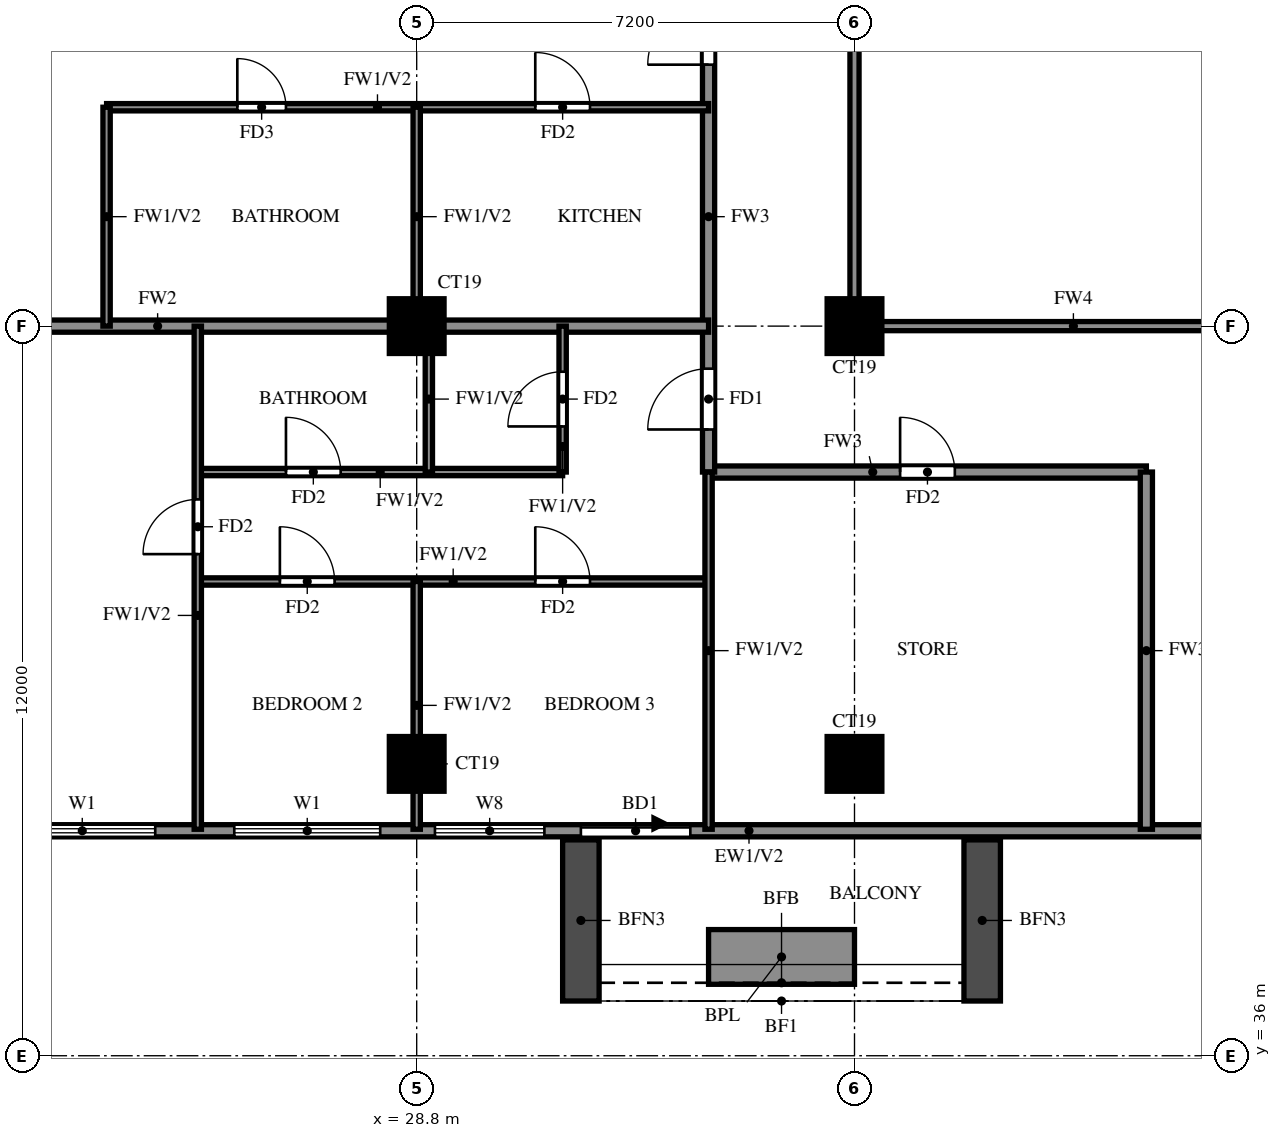
"""IFC4 building model, lengths in metres.
Left out: names, types, materials, properties, quantities, classifications, styles, units other than length and angle.
Written with IfcOpenShell. Run it as: python <this file> out.ifc"""

import sys

from ifc_helpers import new_model, si_unit, direction, frame, frame_2d, origin, origin_2d, place, context, subcontext, project, spatial, rectangle, extrude, source, transform, mapped, element, fill, save


model = new_model("IFC4")
c1 = context("Model", 3, precision=1e-05, world=origin(), true_north=direction((0.0, 1.0)))
c2 = subcontext(c1, "Body", "Model", "MODEL_VIEW")
j1 = project(units=[si_unit("LENGTHUNIT", "METRE"), si_unit("PLANEANGLEUNIT", "RADIAN")], contexts=[c1])
p1 = place(None, origin())
s1 = spatial("IfcSite", under=j1, at=p1, CompositionType="ELEMENT")
p2 = place(p1, origin())
s2 = spatial("IfcBuilding", under=s1, at=p2, CompositionType="ELEMENT")
p3 = place(p2, frame((0.0, 0.0, 174.5)))
s3 = spatial("IfcBuildingStorey", under=s2, at=p3, CompositionType="ELEMENT", Elevation=174.5)
m1 = source(origin(), c2, "Body", "SweptSolid", [
    extrude(rectangle(XDim=0.9, YDim=0.9, at=origin_2d()), origin(), (0.0, 0.0, 1.0), 3.2),
])
for number, where, z_axis, x_axis in (
    (1, (28.8, 40.8, 0.0), (0.0, 0.0, 1.0), (1.0, 0.0, 0.0)),
    (2, (36.0, 40.8, 0.0), (0.0, 0.0, 1.0), (1.0, 0.0, 0.0)),
    (3, (28.8, 48.0, 0.0), (0.0, 0.0, 1.0), (1.0, 0.0, 0.0)),
    (4, (36.0, 48.0, 0.0), (0.0, 0.0, 1.0), (1.0, 0.0, 0.0)),
):
    element("IfcColumn", number, at=place(p3, frame(where, z_axis=z_axis, x_axis=x_axis)), inside=s3, PredefinedType="COLUMN", context=c2, shape_type="MappedRepresentation", body=[
        mapped(m1, transform((0.0, 0.0, 0.0))),
    ])
p4 = place(p3, frame((18.2, 39.7, 0.0), z_axis=(0.0, 0.0, 1.0), x_axis=(1.0, 0.0, 0.0)))
e5 = element("IfcWall", 5, at=p4, inside=s3, PredefinedType="SOLIDWALL", context=c2, shape_type="SweptSolid", body=[
    extrude(rectangle(XDim=23.8, YDim=0.2, at=frame_2d((11.9, 0.0))), origin(), (0.0, 0.0, 1.0), 3.2),
])
p5 = place(p4, frame((13.3, 0.0, 0.0)))
e6 = element("IfcOpeningElement", 6, at=p5, cuts=e5, PredefinedType="OPENING", context=c2, shape_type="SweptSolid", body=[
    extrude(rectangle(XDim=1.8, YDim=2.4, at=frame_2d((0.9, 1.2))), frame((0.0, 0.11, 0.0), z_axis=(0.0, -1.0, 0.0), x_axis=(1.0, 0.0, 0.0)), (0.0, 0.0, 1.0), 0.22),
])
p6 = place(p4, frame((0.9, 0.0, 0.6)))
e7 = element("IfcOpeningElement", 7, at=p6, cuts=e5, PredefinedType="OPENING", context=c2, shape_type="SweptSolid", body=[
    extrude(rectangle(XDim=2.4, YDim=2.4, at=frame_2d((1.2, 1.2))), frame((0.0, 0.11, 0.0), z_axis=(0.0, -1.0, 0.0), x_axis=(1.0, 0.0, 0.0)), (0.0, 0.0, 1.0), 0.22),
])
p7 = place(p4, frame((3.9, 0.0, 0.6)))
e8 = element("IfcOpeningElement", 8, at=p7, cuts=e5, PredefinedType="OPENING", context=c2, shape_type="SweptSolid", body=[
    extrude(rectangle(XDim=2.4, YDim=2.4, at=frame_2d((1.2, 1.2))), frame((0.0, 0.11, 0.0), z_axis=(0.0, -1.0, 0.0), x_axis=(1.0, 0.0, 0.0)), (0.0, 0.0, 1.0), 0.22),
])
p8 = place(p4, frame((7.6, 0.0, 0.6)))
e9 = element("IfcOpeningElement", 9, at=p8, cuts=e5, PredefinedType="OPENING", context=c2, shape_type="SweptSolid", body=[
    extrude(rectangle(XDim=2.4, YDim=2.4, at=frame_2d((1.2, 1.2))), frame((0.0, 0.11, 0.0), z_axis=(0.0, -1.0, 0.0), x_axis=(1.0, 0.0, 0.0)), (0.0, 0.0, 1.0), 0.22),
])
p9 = place(p4, frame((10.9, 0.0, 0.6)))
e10 = element("IfcOpeningElement", 10, at=p9, cuts=e5, PredefinedType="OPENING", context=c2, shape_type="SweptSolid", body=[
    extrude(rectangle(XDim=1.8, YDim=2.4, at=frame_2d((0.9, 1.2))), frame((0.0, 0.11, 0.0), z_axis=(0.0, -1.0, 0.0), x_axis=(1.0, 0.0, 0.0)), (0.0, 0.0, 1.0), 0.22),
])
for number, where, z_axis, x_axis in (
    (11, (31.5, 39.55, 0.0), (0.0, 0.0, 1.0), (0.0, -1.0, 0.0)),
    (12, (38.1, 39.55, 0.0), (0.0, 0.0, 1.0), (0.0, -1.0, 0.0)),
):
    element("IfcWall", number, at=place(p3, frame(where, z_axis=z_axis, x_axis=x_axis)), inside=s3, PredefinedType="SOLIDWALL", context=c2, shape_type="SweptSolid", body=[
        extrude(rectangle(XDim=2.65, YDim=0.6, at=frame_2d((1.325, 0.0))), origin(), (0.0, 0.0, 1.0), 2.85),
    ])
p10 = place(p3, frame((33.6, 37.625, 0.0), z_axis=(0.0, 0.0, 1.0), x_axis=(1.0, 0.0, 0.0)))
e13 = element("IfcWall", 13, at=p10, inside=s3, PredefinedType="SOLIDWALL", context=c2, shape_type="SweptSolid", body=[
    extrude(rectangle(XDim=2.4, YDim=0.9, at=frame_2d((1.2, 0.0))), origin(), (0.0, 0.0, 1.0), 0.9),
])
p11 = place(p3, frame((33.6, 45.6, 0.0), z_axis=(0.0, 0.0, 1.0), x_axis=(1.0, 0.0, 0.0)))
e14 = element("IfcWall", 14, at=p11, inside=s3, PredefinedType="SOLIDWALL", context=c2, shape_type="SweptSolid", body=[
    extrude(rectangle(XDim=7.2, YDim=0.2, at=frame_2d((3.6, 0.0))), origin(), (0.0, 0.0, 1.0), 3.2),
])
p12 = place(p11, frame((3.15, 0.0, 0.0)))
e15 = element("IfcOpeningElement", 15, at=p12, cuts=e14, PredefinedType="OPENING", context=c2, shape_type="SweptSolid", body=[
    extrude(rectangle(XDim=0.9, YDim=2.1, at=frame_2d((0.45, 1.05))), frame((0.0, 0.11, 0.0), z_axis=(0.0, -1.0, 0.0), x_axis=(1.0, 0.0, 0.0)), (0.0, 0.0, 1.0), 0.22),
])
p13 = place(p3, frame((33.6, 45.6, 0.0), z_axis=(0.0, 0.0, 1.0), x_axis=(0.0, 1.0, 0.0)))
e16 = element("IfcWall", 16, at=p13, inside=s3, PredefinedType="SOLIDWALL", context=c2, shape_type="SweptSolid", body=[
    extrude(rectangle(XDim=8.4, YDim=0.2, at=frame_2d((4.2, 0.0))), origin(), (0.0, 0.0, 1.0), 3.2),
])
p14 = place(p13, frame((0.7, 0.0, 0.0)))
e17 = element("IfcOpeningElement", 17, at=p14, cuts=e16, PredefinedType="OPENING", context=c2, shape_type="SweptSolid", body=[
    extrude(rectangle(XDim=1.0, YDim=2.1, at=frame_2d((0.5, 1.05))), frame((0.0, 0.11, 0.0), z_axis=(0.0, -1.0, 0.0), x_axis=(1.0, 0.0, 0.0)), (0.0, 0.0, 1.0), 0.22),
])
p15 = place(p13, frame((6.7, 0.0, 0.0)))
e18 = element("IfcOpeningElement", 18, at=p15, cuts=e16, PredefinedType="OPENING", context=c2, shape_type="SweptSolid", body=[
    extrude(rectangle(XDim=1.0, YDim=2.1, at=frame_2d((0.5, 1.05))), frame((0.0, 0.11, 0.0), z_axis=(0.0, -1.0, 0.0), x_axis=(1.0, 0.0, 0.0)), (0.0, 0.0, 1.0), 0.22),
])
p16 = place(p3, frame((40.8, 39.725, 0.0), z_axis=(0.0, 0.0, 1.0), x_axis=(0.0, 1.0, 0.0)))
e19 = element("IfcWall", 19, at=p16, inside=s3, PredefinedType="SOLIDWALL", context=c2, shape_type="SweptSolid", body=[
    extrude(rectangle(XDim=5.875, YDim=0.2, at=frame_2d((2.938, 0.0))), origin(), (0.0, 0.0, 1.0), 3.2),
])
p17 = place(p3, frame((14.525, 48.0, 0.0), z_axis=(0.0, 0.0, 1.0), x_axis=(1.0, 0.0, 0.0)))
e20 = element("IfcWall", 20, at=p17, inside=s3, PredefinedType="SOLIDWALL", context=c2, shape_type="SweptSolid", body=[
    extrude(rectangle(XDim=19.075, YDim=0.2, at=frame_2d((9.538, 0.0))), origin(), (0.0, 0.0, 1.0), 3.2),
])
p18 = place(p3, frame((25.2, 43.8, 0.0), z_axis=(0.0, 0.0, 1.0), x_axis=(1.0, 0.0, 0.0)))
e21 = element("IfcWall", 21, at=p18, inside=s3, PredefinedType="PARTITIONING", context=c2, shape_type="SweptSolid", body=[
    extrude(rectangle(XDim=8.4, YDim=0.12, at=frame_2d((4.2, 0.0))), origin(), (0.0, 0.0, 1.0), 3.2),
])
p19 = place(p18, frame((1.35, 0.0, 0.0)))
e22 = element("IfcOpeningElement", 22, at=p19, cuts=e21, PredefinedType="OPENING", context=c2, shape_type="SweptSolid", body=[
    extrude(rectangle(XDim=0.9, YDim=2.1, at=frame_2d((0.45, 1.05))), frame((0.0, 0.07, 0.0), z_axis=(0.0, -1.0, 0.0), x_axis=(1.0, 0.0, 0.0)), (0.0, 0.0, 1.0), 0.14),
])
p20 = place(p18, frame((5.55, 0.0, 0.0)))
e23 = element("IfcOpeningElement", 23, at=p20, cuts=e21, PredefinedType="OPENING", context=c2, shape_type="SweptSolid", body=[
    extrude(rectangle(XDim=0.9, YDim=2.1, at=frame_2d((0.45, 1.05))), frame((0.0, 0.07, 0.0), z_axis=(0.0, -1.0, 0.0), x_axis=(1.0, 0.0, 0.0)), (0.0, 0.0, 1.0), 0.14),
])
p21 = place(p3, frame((25.2, 45.6, 0.0), z_axis=(0.0, 0.0, 1.0), x_axis=(1.0, 0.0, 0.0)))
e24 = element("IfcWall", 24, at=p21, inside=s3, PredefinedType="PARTITIONING", context=c2, shape_type="SweptSolid", body=[
    extrude(rectangle(XDim=6.0, YDim=0.12, at=frame_2d((3.0, 0.0))), origin(), (0.0, 0.0, 1.0), 3.2),
])
p22 = place(p21, frame((1.45, 0.0, 0.0)))
e25 = element("IfcOpeningElement", 25, at=p22, cuts=e24, PredefinedType="OPENING", context=c2, shape_type="SweptSolid", body=[
    extrude(rectangle(XDim=0.9, YDim=2.1, at=frame_2d((0.45, 1.05))), frame((0.0, 0.07, 0.0), z_axis=(0.0, -1.0, 0.0), x_axis=(1.0, 0.0, 0.0)), (0.0, 0.0, 1.0), 0.14),
])
p23 = place(p3, frame((23.7, 51.6, 0.0), z_axis=(0.0, 0.0, 1.0), x_axis=(1.0, 0.0, 0.0)))
e26 = element("IfcWall", 26, at=p23, inside=s3, PredefinedType="PARTITIONING", context=c2, shape_type="SweptSolid", body=[
    extrude(rectangle(XDim=9.9, YDim=0.12, at=frame_2d((4.95, 0.0))), origin(), (0.0, 0.0, 1.0), 3.2),
])
p24 = place(p23, frame((2.15, 0.0, 0.0)))
e27 = element("IfcOpeningElement", 27, at=p24, cuts=e26, PredefinedType="OPENING", context=c2, shape_type="SweptSolid", body=[
    extrude(rectangle(XDim=0.8, YDim=2.1, at=frame_2d((0.4, 1.05))), frame((0.0, 0.07, 0.0), z_axis=(0.0, -1.0, 0.0), x_axis=(1.0, 0.0, 0.0)), (0.0, 0.0, 1.0), 0.14),
])
p25 = place(p23, frame((7.05, 0.0, 0.0)))
e28 = element("IfcOpeningElement", 28, at=p25, cuts=e26, PredefinedType="OPENING", context=c2, shape_type="SweptSolid", body=[
    extrude(rectangle(XDim=0.9, YDim=2.1, at=frame_2d((0.45, 1.05))), frame((0.0, 0.07, 0.0), z_axis=(0.0, -1.0, 0.0), x_axis=(1.0, 0.0, 0.0)), (0.0, 0.0, 1.0), 0.14),
])
p26 = place(p3, frame((23.7, 48.0, 0.0), z_axis=(0.0, 0.0, 1.0), x_axis=(0.0, 1.0, 0.0)))
e29 = element("IfcWall", 29, at=p26, inside=s3, PredefinedType="PARTITIONING", context=c2, shape_type="SweptSolid", body=[
    extrude(rectangle(XDim=3.6, YDim=0.12, at=frame_2d((1.8, 0.0))), origin(), (0.0, 0.0, 1.0), 3.2),
])
p27 = place(p3, frame((25.2, 39.725, 0.0), z_axis=(0.0, 0.0, 1.0), x_axis=(0.0, 1.0, 0.0)))
e30 = element("IfcWall", 30, at=p27, inside=s3, PredefinedType="PARTITIONING", context=c2, shape_type="SweptSolid", body=[
    extrude(rectangle(XDim=8.275, YDim=0.12, at=frame_2d((4.137, 0.0))), origin(), (0.0, 0.0, 1.0), 3.2),
])
p28 = place(p27, frame((4.525, 0.0, 0.0)))
e31 = element("IfcOpeningElement", 31, at=p28, cuts=e30, PredefinedType="OPENING", context=c2, shape_type="SweptSolid", body=[
    extrude(rectangle(XDim=0.9, YDim=2.1, at=frame_2d((0.45, 1.05))), frame((0.0, 0.07, 0.0), z_axis=(0.0, -1.0, 0.0), x_axis=(1.0, 0.0, 0.0)), (0.0, 0.0, 1.0), 0.14),
])
p29 = place(p3, frame((28.8, 39.725, 0.0), z_axis=(0.0, 0.0, 1.0), x_axis=(0.0, 1.0, 0.0)))
e32 = element("IfcWall", 32, at=p29, inside=s3, PredefinedType="PARTITIONING", context=c2, shape_type="SweptSolid", body=[
    extrude(rectangle(XDim=4.075, YDim=0.12, at=frame_2d((2.038, 0.0))), origin(), (0.0, 0.0, 1.0), 3.2),
])
p30 = place(p3, frame((28.8, 48.0, 0.0), z_axis=(0.0, 0.0, 1.0), x_axis=(0.0, 1.0, 0.0)))
e33 = element("IfcWall", 33, at=p30, inside=s3, PredefinedType="PARTITIONING", context=c2, shape_type="SweptSolid", body=[
    extrude(rectangle(XDim=3.6, YDim=0.12, at=frame_2d((1.8, 0.0))), origin(), (0.0, 0.0, 1.0), 3.2),
])
p31 = place(p3, frame((29.0, 45.6, 0.0), z_axis=(0.0, 0.0, 1.0), x_axis=(0.0, 1.0, 0.0)))
e34 = element("IfcWall", 34, at=p31, inside=s3, PredefinedType="PARTITIONING", context=c2, shape_type="SweptSolid", body=[
    extrude(rectangle(XDim=2.4, YDim=0.12, at=frame_2d((1.2, 0.0))), origin(), (0.0, 0.0, 1.0), 3.2),
])
p32 = place(p3, frame((31.2, 45.6, 0.0), z_axis=(0.0, 0.0, 1.0), x_axis=(0.0, 1.0, 0.0)))
e35 = element("IfcWall", 35, at=p32, inside=s3, PredefinedType="PARTITIONING", context=c2, shape_type="SweptSolid", body=[
    extrude(rectangle(XDim=2.4, YDim=0.12, at=frame_2d((1.2, 0.0))), origin(), (0.0, 0.0, 1.0), 3.2),
])
p33 = place(p32, frame((0.75, 0.0, 0.0)))
e36 = element("IfcOpeningElement", 36, at=p33, cuts=e35, PredefinedType="OPENING", context=c2, shape_type="SweptSolid", body=[
    extrude(rectangle(XDim=0.9, YDim=2.1, at=frame_2d((0.45, 1.05))), frame((0.0, 0.07, 0.0), z_axis=(0.0, -1.0, 0.0), x_axis=(1.0, 0.0, 0.0)), (0.0, 0.0, 1.0), 0.14),
])
p34 = place(p3, frame((33.6, 39.725, 0.0), z_axis=(0.0, 0.0, 1.0), x_axis=(0.0, 1.0, 0.0)))
e37 = element("IfcWall", 37, at=p34, inside=s3, PredefinedType="PARTITIONING", context=c2, shape_type="SweptSolid", body=[
    extrude(rectangle(XDim=5.875, YDim=0.12, at=frame_2d((2.938, 0.0))), origin(), (0.0, 0.0, 1.0), 3.2),
])
p35 = place(p3, frame((36.0, 48.0, 0.0), z_axis=(0.0, 0.0, 1.0), x_axis=(1.0, 0.0, 0.0)))
e38 = element("IfcWall", 38, at=p35, inside=s3, PredefinedType="SOLIDWALL", context=c2, shape_type="SweptSolid", body=[
    extrude(rectangle(XDim=7.2, YDim=0.15, at=frame_2d((3.6, 0.0))), origin(), (0.0, 0.0, 1.0), 2.3),
])
p36 = place(p3, frame((36.0, 48.0, 0.0), z_axis=(0.0, 0.0, 1.0), x_axis=(0.0, 1.0, 0.0)))
e39 = element("IfcWall", 39, at=p36, inside=s3, PredefinedType="SOLIDWALL", context=c2, shape_type="SweptSolid", body=[
    extrude(rectangle(XDim=14.4, YDim=0.15, at=frame_2d((7.2, 0.0))), origin(), (0.0, 0.0, 1.0), 2.3),
])
p37 = place(p5, origin())
e40 = element("IfcDoor", 40, at=p37, inside=s3, OperationType="DOUBLE_DOOR_SLIDING", PredefinedType="DOOR", context=c2, shape_type="SweptSolid", body=[
    extrude(rectangle(XDim=1.8, YDim=2.4, at=frame_2d((0.9, 1.2))), frame((0.0, 0.025, 0.0), z_axis=(0.0, -1.0, 0.0), x_axis=(1.0, 0.0, 0.0)), (0.0, 0.0, 1.0), 0.05),
])
fill(e6, e40)
p38 = place(p7, origin())
e41 = element("IfcWindow", 41, at=p38, inside=s3, PartitioningType="DOUBLE_PANEL_VERTICAL", PredefinedType="WINDOW", context=c2, shape_type="SweptSolid", body=[
    extrude(rectangle(XDim=2.4, YDim=2.4, at=frame_2d((1.2, 1.2))), frame((0.0, 0.03, 0.0), z_axis=(0.0, -1.0, 0.0), x_axis=(1.0, 0.0, 0.0)), (0.0, 0.0, 1.0), 0.06),
])
fill(e8, e41)
p39 = place(p8, origin())
e42 = element("IfcWindow", 42, at=p39, inside=s3, PartitioningType="DOUBLE_PANEL_VERTICAL", PredefinedType="WINDOW", context=c2, shape_type="SweptSolid", body=[
    extrude(rectangle(XDim=2.4, YDim=2.4, at=frame_2d((1.2, 1.2))), frame((0.0, 0.03, 0.0), z_axis=(0.0, -1.0, 0.0), x_axis=(1.0, 0.0, 0.0)), (0.0, 0.0, 1.0), 0.06),
])
fill(e9, e42)
p40 = place(p9, origin())
e43 = element("IfcWindow", 43, at=p40, inside=s3, PartitioningType="DOUBLE_PANEL_VERTICAL", PredefinedType="WINDOW", context=c2, shape_type="SweptSolid", body=[
    extrude(rectangle(XDim=1.8, YDim=2.4, at=frame_2d((0.9, 1.2))), frame((0.0, 0.03, 0.0), z_axis=(0.0, -1.0, 0.0), x_axis=(1.0, 0.0, 0.0)), (0.0, 0.0, 1.0), 0.06),
])
fill(e10, e43)
p41 = place(p14, origin())
e44 = element("IfcDoor", 44, at=p41, inside=s3, OperationType="SINGLE_SWING_LEFT", PredefinedType="DOOR", context=c2, shape_type="SweptSolid", body=[
    extrude(rectangle(XDim=1.0, YDim=2.1, at=frame_2d((0.5, 1.05))), frame((0.0, 0.025, 0.0), z_axis=(0.0, -1.0, 0.0), x_axis=(1.0, 0.0, 0.0)), (0.0, 0.0, 1.0), 0.05),
])
fill(e17, e44)
p42 = place(p28, origin())
e45 = element("IfcDoor", 45, at=p42, inside=s3, OperationType="SINGLE_SWING_LEFT", PredefinedType="DOOR", context=c2, shape_type="SweptSolid", body=[
    extrude(rectangle(XDim=0.9, YDim=2.1, at=frame_2d((0.45, 1.05))), frame((0.0, 0.025, 0.0), z_axis=(0.0, -1.0, 0.0), x_axis=(1.0, 0.0, 0.0)), (0.0, 0.0, 1.0), 0.05),
])
fill(e31, e45)
p43 = place(p19, origin())
e46 = element("IfcDoor", 46, at=p43, inside=s3, OperationType="SINGLE_SWING_RIGHT", PredefinedType="DOOR", context=c2, shape_type="SweptSolid", body=[
    extrude(rectangle(XDim=0.9, YDim=2.1, at=frame_2d((0.45, 1.05))), frame((0.0, 0.025, 0.0), z_axis=(0.0, -1.0, 0.0), x_axis=(1.0, 0.0, 0.0)), (0.0, 0.0, 1.0), 0.05),
])
fill(e22, e46)
p44 = place(p20, origin())
e47 = element("IfcDoor", 47, at=p44, inside=s3, OperationType="SINGLE_SWING_LEFT", PredefinedType="DOOR", context=c2, shape_type="SweptSolid", body=[
    extrude(rectangle(XDim=0.9, YDim=2.1, at=frame_2d((0.45, 1.05))), frame((0.0, 0.025, 0.0), z_axis=(0.0, -1.0, 0.0), x_axis=(1.0, 0.0, 0.0)), (0.0, 0.0, 1.0), 0.05),
])
fill(e23, e47)
p45 = place(p22, origin())
e48 = element("IfcDoor", 48, at=p45, inside=s3, OperationType="SINGLE_SWING_LEFT", PredefinedType="DOOR", context=c2, shape_type="SweptSolid", body=[
    extrude(rectangle(XDim=0.9, YDim=2.1, at=frame_2d((0.45, 1.05))), frame((0.0, 0.025, 0.0), z_axis=(0.0, -1.0, 0.0), x_axis=(1.0, 0.0, 0.0)), (0.0, 0.0, 1.0), 0.05),
])
fill(e25, e48)
p46 = place(p33, origin())
e49 = element("IfcDoor", 49, at=p46, inside=s3, OperationType="SINGLE_SWING_RIGHT", PredefinedType="DOOR", context=c2, shape_type="SweptSolid", body=[
    extrude(rectangle(XDim=0.9, YDim=2.1, at=frame_2d((0.45, 1.05))), frame((0.0, 0.025, 0.0), z_axis=(0.0, -1.0, 0.0), x_axis=(1.0, 0.0, 0.0)), (0.0, 0.0, 1.0), 0.05),
])
fill(e36, e49)
p47 = place(p12, origin())
e50 = element("IfcDoor", 50, at=p47, inside=s3, OperationType="SINGLE_SWING_LEFT", PredefinedType="DOOR", context=c2, shape_type="SweptSolid", body=[
    extrude(rectangle(XDim=0.9, YDim=2.1, at=frame_2d((0.45, 1.05))), frame((0.0, 0.025, 0.0), z_axis=(0.0, -1.0, 0.0), x_axis=(1.0, 0.0, 0.0)), (0.0, 0.0, 1.0), 0.05),
])
fill(e15, e50)
p48 = place(p15, origin())
e51 = element("IfcDoor", 51, at=p48, inside=s3, OperationType="SINGLE_SWING_LEFT", PredefinedType="DOOR", context=c2, shape_type="SweptSolid", body=[
    extrude(rectangle(XDim=1.0, YDim=2.1, at=frame_2d((0.5, 1.05))), frame((0.0, 0.025, 0.0), z_axis=(0.0, -1.0, 0.0), x_axis=(1.0, 0.0, 0.0)), (0.0, 0.0, 1.0), 0.05),
])
fill(e18, e51)
p49 = place(p24, origin())
e52 = element("IfcDoor", 52, at=p49, inside=s3, OperationType="SINGLE_SWING_LEFT", PredefinedType="DOOR", context=c2, shape_type="SweptSolid", body=[
    extrude(rectangle(XDim=0.8, YDim=2.1, at=frame_2d((0.4, 1.05))), frame((0.0, 0.025, 0.0), z_axis=(0.0, -1.0, 0.0), x_axis=(1.0, 0.0, 0.0)), (0.0, 0.0, 1.0), 0.05),
])
fill(e27, e52)
p50 = place(p25, origin())
e53 = element("IfcDoor", 53, at=p50, inside=s3, OperationType="SINGLE_SWING_LEFT", PredefinedType="DOOR", context=c2, shape_type="SweptSolid", body=[
    extrude(rectangle(XDim=0.9, YDim=2.1, at=frame_2d((0.45, 1.05))), frame((0.0, 0.025, 0.0), z_axis=(0.0, -1.0, 0.0), x_axis=(1.0, 0.0, 0.0)), (0.0, 0.0, 1.0), 0.05),
])
fill(e28, e53)
save(model, sys.argv[1])
